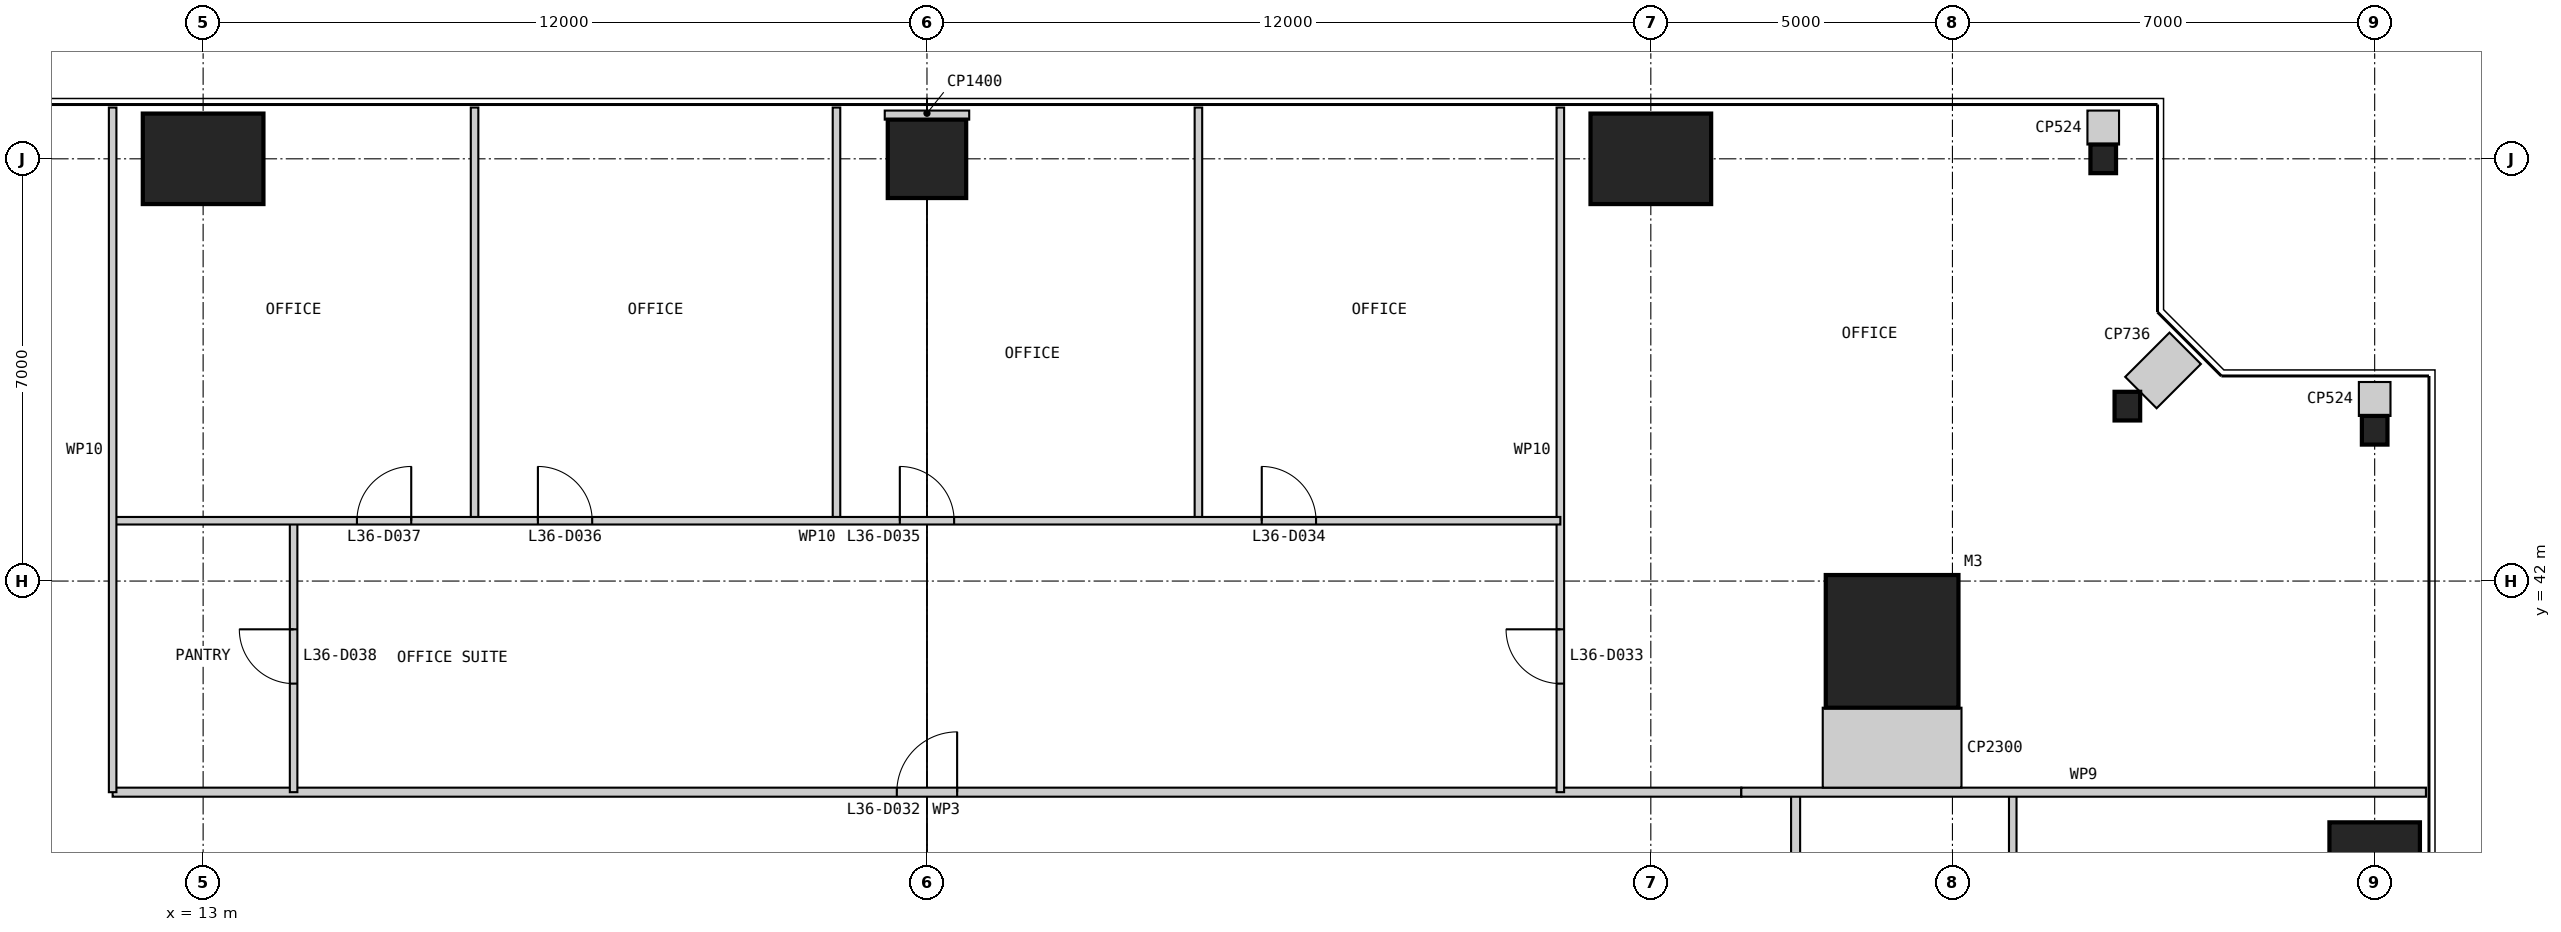
"""IFC4 building model, lengths in metres.
Left out: names, types, materials, properties, quantities, classifications, styles, units other than length and angle.
Written with IfcOpenShell. Run it as: python <this file> out.ifc"""

import sys

from ifc_helpers import new_model, si_unit, direction, frame, frame_2d, origin, origin_2d, place, context, subcontext, project, spatial, rectangle, i_section, extrude, element, fill, save


model = new_model("IFC4")
c1 = context("Model", 3, precision=1e-05, world=origin(), true_north=direction((0.0, 1.0)))
c2 = subcontext(c1, "Body", "Model", "MODEL_VIEW")
j1 = project(units=[si_unit("LENGTHUNIT", "METRE"), si_unit("PLANEANGLEUNIT", "RADIAN")], contexts=[c1])
p1 = place(None, origin())
s1 = spatial("IfcSite", under=j1, at=p1, CompositionType="ELEMENT")
p2 = place(p1, origin())
s2 = spatial("IfcBuilding", under=s1, at=p2, CompositionType="ELEMENT")
p3 = place(p2, frame((0.0, 0.0, 154.4)))
s3 = spatial("IfcBuildingStorey", under=s2, at=p3, CompositionType="ELEMENT", Elevation=154.4)
p4 = place(p3, frame((41.0, 41.0, 0.0), z_axis=(0.0, 0.0, 1.0), x_axis=(1.0, 0.0, 0.0)))
e1 = element("IfcColumn", 1, at=p4, inside=s3, PredefinedType="COLUMN", context=c2, shape_type="SweptSolid", body=[
    extrude(rectangle(XDim=2.2, YDim=2.2, at=origin_2d()), origin(), (0.0, 0.0, 1.0), 4.0),
])
p5 = place(p3, frame((49.0, 37.0, 0.0), z_axis=(0.0, 0.0, 1.0), x_axis=(1.0, 0.0, 0.0)))
e2 = element("IfcColumn", 2, at=p5, inside=s3, PredefinedType="COLUMN", context=c2, shape_type="SweptSolid", body=[
    extrude(rectangle(XDim=1.5, YDim=2.0, at=origin_2d()), origin(), (0.0, 0.0, 1.0), 4.0),
])
for number, where, z_axis, x_axis in (
    (3, (49.0, 44.5, 0.0), (0.0, 0.0, 1.0), (1.0, 0.0, 0.0)),
    (4, (44.9, 44.9, 0.0), (0.0, 0.0, 1.0), (1.0, 0.0, 0.0)),
    (5, (44.5, 49.0, 0.0), (0.0, 0.0, 1.0), (1.0, 0.0, 0.0)),
):
    element("IfcColumn", number, at=place(p3, frame(where, z_axis=z_axis, x_axis=x_axis)), inside=s3, PredefinedType="COLUMN", context=c2, shape_type="SweptSolid", body=[
        extrude(i_section(OverallWidth=0.424, OverallDepth=0.475, WebThickness=0.048, FlangeThickness=0.077, at=origin_2d()), origin(), (0.0, 0.0, 1.0), 4.0),
    ])
p6 = place(p3, frame((37.0, 49.0, 0.0), z_axis=(0.0, 0.0, 1.0), x_axis=(1.0, 0.0, 0.0)))
e6 = element("IfcColumn", 6, at=p6, inside=s3, PredefinedType="COLUMN", context=c2, shape_type="SweptSolid", body=[
    extrude(rectangle(XDim=2.0, YDim=1.5, at=origin_2d()), origin(), (0.0, 0.0, 1.0), 4.0),
])
p7 = place(p3, frame((25.0, 49.0, 0.0), z_axis=(0.0, 0.0, 1.0), x_axis=(1.0, 0.0, 0.0)))
e7 = element("IfcColumn", 7, at=p7, inside=s3, PredefinedType="COLUMN", context=c2, shape_type="SweptSolid", body=[
    extrude(rectangle(XDim=1.3, YDim=1.3, at=origin_2d()), origin(), (0.0, 0.0, 1.0), 4.0),
])
p8 = place(p3, frame((13.0, 49.0, 0.0), z_axis=(0.0, 0.0, 1.0), x_axis=(1.0, 0.0, 0.0)))
e8 = element("IfcColumn", 8, at=p8, inside=s3, PredefinedType="COLUMN", context=c2, shape_type="SweptSolid", body=[
    extrude(rectangle(XDim=2.0, YDim=1.5, at=origin_2d()), origin(), (0.0, 0.0, 1.0), 4.0),
])
p9 = place(p3, frame((39.4, 11.5, 0.0), z_axis=(0.0, 0.0, 1.0), x_axis=(0.0, 1.0, 0.0)))
e9 = element("IfcWall", 9, at=p9, inside=s3, PredefinedType="PARTITIONING", context=c2, shape_type="SweptSolid", body=[
    extrude(rectangle(XDim=27.0, YDim=0.15, at=frame_2d((13.5, 0.0))), origin(), (0.0, 0.0, 1.0), 3.85),
])
p10 = place(p9, frame((3.25, 0.0, 0.0)))
e10 = element("IfcOpeningElement", 10, at=p10, cuts=e9, PredefinedType="OPENING", context=c2, shape_type="SweptSolid", body=[
    extrude(rectangle(XDim=1.0, YDim=2.2, at=frame_2d((0.5, 1.1))), frame((0.0, 0.085, 0.0), z_axis=(0.0, -1.0, 0.0), x_axis=(1.0, 0.0, 0.0)), (0.0, 0.0, 1.0), 0.17),
])
p11 = place(p9, frame((22.75, 0.0, 0.0)))
e11 = element("IfcOpeningElement", 11, at=p11, cuts=e9, PredefinedType="OPENING", context=c2, shape_type="SweptSolid", body=[
    extrude(rectangle(XDim=1.0, YDim=2.2, at=frame_2d((0.5, 1.1))), frame((0.0, 0.085, 0.0), z_axis=(0.0, -1.0, 0.0), x_axis=(1.0, 0.0, 0.0)), (0.0, 0.0, 1.0), 0.17),
])
p12 = place(p9, frame((0.25, 0.0, 0.0)))
e12 = element("IfcOpeningElement", 12, at=p12, cuts=e9, PredefinedType="OPENING", context=c2, shape_type="SweptSolid", body=[
    extrude(rectangle(XDim=1.0, YDim=2.2, at=frame_2d((0.5, 1.1))), frame((0.0, 0.085, 0.0), z_axis=(0.0, -1.0, 0.0), x_axis=(1.0, 0.0, 0.0)), (0.0, 0.0, 1.0), 0.17),
])
p13 = place(p3, frame((43.0, 32.5, 0.0), z_axis=(0.0, 0.0, 1.0), x_axis=(0.0, 1.0, 0.0)))
e13 = element("IfcWall", 13, at=p13, inside=s3, PredefinedType="PARTITIONING", context=c2, shape_type="SweptSolid", body=[
    extrude(rectangle(XDim=6.0, YDim=0.125, at=frame_2d((3.0, 0.0))), origin(), (0.0, 0.0, 1.0), 3.238),
])
p14 = place(p3, frame((38.5, 38.5, 0.0), z_axis=(0.0, 0.0, 1.0), x_axis=(-1.0, 0.0, 0.0)))
e14 = element("IfcWall", 14, at=p14, inside=s3, PredefinedType="PARTITIONING", context=c2, shape_type="SweptSolid", body=[
    extrude(rectangle(XDim=27.0, YDim=0.15, at=frame_2d((13.5, 0.0))), origin(), (0.0, 0.0, 1.0), 3.85),
])
p15 = place(p14, frame((13.0, 0.0, 0.0)))
e15 = element("IfcOpeningElement", 15, at=p15, cuts=e14, PredefinedType="OPENING", context=c2, shape_type="SweptSolid", body=[
    extrude(rectangle(XDim=1.0, YDim=2.2, at=frame_2d((0.5, 1.1))), frame((0.0, 0.085, 0.0), z_axis=(0.0, -1.0, 0.0), x_axis=(1.0, 0.0, 0.0)), (0.0, 0.0, 1.0), 0.17),
])
p16 = place(p3, frame((49.85, 38.5, 0.0), z_axis=(0.0, 0.0, 1.0), x_axis=(-1.0, 0.0, 0.0)))
e16 = element("IfcWall", 16, at=p16, inside=s3, PredefinedType="PARTITIONING", context=c2, shape_type="SweptSolid", body=[
    extrude(rectangle(XDim=11.35, YDim=0.15, at=frame_2d((5.675, 0.0))), origin(), (0.0, 0.0, 1.0), 3.85),
])
p17 = place(p3, frame((35.5, 49.85, 0.0), z_axis=(0.0, 0.0, 1.0), x_axis=(0.0, -1.0, 0.0)))
e17 = element("IfcWall", 17, at=p17, inside=s3, PredefinedType="PARTITIONING", context=c2, shape_type="SweptSolid", body=[
    extrude(rectangle(XDim=11.35, YDim=0.125, at=frame_2d((5.675, 0.0))), origin(), (0.0, 0.0, 1.0), 3.85),
])
p18 = place(p17, frame((8.65, 0.0, 0.0)))
e18 = element("IfcOpeningElement", 18, at=p18, cuts=e17, PredefinedType="OPENING", context=c2, shape_type="SweptSolid", body=[
    extrude(rectangle(XDim=0.9, YDim=2.2, at=frame_2d((0.45, 1.1))), frame((0.0, 0.073, 0.0), z_axis=(0.0, -1.0, 0.0), x_axis=(1.0, 0.0, 0.0)), (0.0, 0.0, 1.0), 0.145),
])
for number, where, z_axis, x_axis in (
    (19, (29.5, 49.85, 0.0), (0.0, 0.0, 1.0), (0.0, -1.0, 0.0)),
    (20, (23.5, 49.85, 0.0), (0.0, 0.0, 1.0), (0.0, -1.0, 0.0)),
    (21, (17.5, 49.85, 0.0), (0.0, 0.0, 1.0), (0.0, -1.0, 0.0)),
):
    element("IfcWall", number, at=place(p3, frame(where, z_axis=z_axis, x_axis=x_axis)), inside=s3, PredefinedType="PARTITIONING", context=c2, shape_type="SweptSolid", body=[
        extrude(rectangle(XDim=6.85, YDim=0.125, at=frame_2d((3.425, 0.0))), origin(), (0.0, 0.0, 1.0), 3.85),
    ])
p19 = place(p3, frame((14.5, 43.0, 0.0), z_axis=(0.0, 0.0, 1.0), x_axis=(0.0, -1.0, 0.0)))
e22 = element("IfcWall", 22, at=p19, inside=s3, PredefinedType="PARTITIONING", context=c2, shape_type="SweptSolid", body=[
    extrude(rectangle(XDim=4.5, YDim=0.125, at=frame_2d((2.25, 0.0))), origin(), (0.0, 0.0, 1.0), 3.85),
])
p20 = place(p19, frame((1.8, 0.0, 0.0)))
e23 = element("IfcOpeningElement", 23, at=p20, cuts=e22, PredefinedType="OPENING", context=c2, shape_type="SweptSolid", body=[
    extrude(rectangle(XDim=0.9, YDim=2.2, at=frame_2d((0.45, 1.1))), frame((0.0, 0.073, 0.0), z_axis=(0.0, -1.0, 0.0), x_axis=(1.0, 0.0, 0.0)), (0.0, 0.0, 1.0), 0.145),
])
p21 = place(p3, frame((35.5, 43.0, 0.0), z_axis=(0.0, 0.0, 1.0), x_axis=(-1.0, 0.0, 0.0)))
e24 = element("IfcWall", 24, at=p21, inside=s3, PredefinedType="PARTITIONING", context=c2, shape_type="SweptSolid", body=[
    extrude(rectangle(XDim=24.0, YDim=0.125, at=frame_2d((12.0, 0.0))), origin(), (0.0, 0.0, 1.0), 3.85),
])
p22 = place(p21, frame((4.05, 0.0, 0.0)))
e25 = element("IfcOpeningElement", 25, at=p22, cuts=e24, PredefinedType="OPENING", context=c2, shape_type="SweptSolid", body=[
    extrude(rectangle(XDim=0.9, YDim=2.2, at=frame_2d((0.45, 1.1))), frame((0.0, 0.073, 0.0), z_axis=(0.0, -1.0, 0.0), x_axis=(1.0, 0.0, 0.0)), (0.0, 0.0, 1.0), 0.145),
])
p23 = place(p21, frame((10.05, 0.0, 0.0)))
e26 = element("IfcOpeningElement", 26, at=p23, cuts=e24, PredefinedType="OPENING", context=c2, shape_type="SweptSolid", body=[
    extrude(rectangle(XDim=0.9, YDim=2.2, at=frame_2d((0.45, 1.1))), frame((0.0, 0.073, 0.0), z_axis=(0.0, -1.0, 0.0), x_axis=(1.0, 0.0, 0.0)), (0.0, 0.0, 1.0), 0.145),
])
p24 = place(p21, frame((16.05, 0.0, 0.0)))
e27 = element("IfcOpeningElement", 27, at=p24, cuts=e24, PredefinedType="OPENING", context=c2, shape_type="SweptSolid", body=[
    extrude(rectangle(XDim=0.9, YDim=2.2, at=frame_2d((0.45, 1.1))), frame((0.0, 0.073, 0.0), z_axis=(0.0, -1.0, 0.0), x_axis=(1.0, 0.0, 0.0)), (0.0, 0.0, 1.0), 0.145),
])
p25 = place(p21, frame((19.05, 0.0, 0.0)))
e28 = element("IfcOpeningElement", 28, at=p25, cuts=e24, PredefinedType="OPENING", context=c2, shape_type="SweptSolid", body=[
    extrude(rectangle(XDim=0.9, YDim=2.2, at=frame_2d((0.45, 1.1))), frame((0.0, 0.073, 0.0), z_axis=(0.0, -1.0, 0.0), x_axis=(1.0, 0.0, 0.0)), (0.0, 0.0, 1.0), 0.145),
])
p26 = place(p3, frame((11.5, 49.85, 0.0), z_axis=(0.0, 0.0, 1.0), x_axis=(0.0, -1.0, 0.0)))
e29 = element("IfcWall", 29, at=p26, inside=s3, PredefinedType="PARTITIONING", context=c2, shape_type="SweptSolid", body=[
    extrude(rectangle(XDim=11.35, YDim=0.125, at=frame_2d((5.675, 0.0))), origin(), (0.0, 0.0, 1.0), 3.85),
])
p27 = place(p3, frame((41.0, 38.575, 0.0), z_axis=(0.0, 0.0, 1.0), x_axis=(0.0, 1.0, 0.0)))
e30 = element("IfcWall", 30, at=p27, inside=s3, PredefinedType="PARTITIONING", context=c2, shape_type="SweptSolid", body=[
    extrude(rectangle(XDim=1.325, YDim=2.3, at=frame_2d((0.663, 0.0))), origin(), (0.0, 0.0, 1.0), 3.85),
])
p28 = place(p3, frame((49.0, 45.3, 0.0), z_axis=(0.0, 0.0, 1.0), x_axis=(0.0, -1.0, 0.0)))
e31 = element("IfcWall", 31, at=p28, inside=s3, PredefinedType="PARTITIONING", context=c2, shape_type="SweptSolid", body=[
    extrude(rectangle(XDim=0.562, YDim=0.524, at=frame_2d((0.281, 0.0))), origin(), (0.0, 0.0, 1.0), 3.85),
])
p29 = place(p3, frame((45.859, 45.859, 0.0), z_axis=(0.0, 0.0, 1.0), x_axis=(-0.707106781187, -0.707106781187, 0.0)))
e32 = element("IfcWall", 32, at=p29, inside=s3, PredefinedType="PARTITIONING", context=c2, shape_type="SweptSolid", body=[
    extrude(rectangle(XDim=1.038, YDim=0.736, at=frame_2d((0.519, 0.0))), origin(), (0.0, 0.0, 1.0), 3.85),
])
p30 = place(p3, frame((44.5, 49.8, 0.0), z_axis=(0.0, 0.0, 1.0), x_axis=(0.0, -1.0, 0.0)))
e33 = element("IfcWall", 33, at=p30, inside=s3, PredefinedType="PARTITIONING", context=c2, shape_type="SweptSolid", body=[
    extrude(rectangle(XDim=0.562, YDim=0.524, at=frame_2d((0.281, 0.0))), origin(), (0.0, 0.0, 1.0), 3.85),
])
p31 = place(p3, frame((25.0, 49.8, 0.0), z_axis=(0.0, 0.0, 1.0), x_axis=(0.0, -1.0, 0.0)))
e34 = element("IfcWall", 34, at=p31, inside=s3, PredefinedType="PARTITIONING", context=c2, shape_type="SweptSolid", body=[
    extrude(rectangle(XDim=0.15, YDim=1.4, at=frame_2d((0.075, 0.0))), origin(), (0.0, 0.0, 1.0), 3.85),
])
p32 = place(p15, frame((1.0, 0.0, 0.0), z_axis=(0.0, 0.0, 1.0), x_axis=(-1.0, 0.0, 0.0)))
e35 = element("IfcDoor", 35, at=p32, inside=s3, OperationType="SINGLE_SWING_RIGHT", PredefinedType="DOOR", context=c2, shape_type="SweptSolid", body=[
    extrude(rectangle(XDim=1.0, YDim=2.2, at=frame_2d((0.5, 1.1))), frame((0.0, 0.025, 0.0), z_axis=(0.0, -1.0, 0.0), x_axis=(1.0, 0.0, 0.0)), (0.0, 0.0, 1.0), 0.05),
])
fill(e15, e35)
p33 = place(p18, frame((0.9, 0.0, 0.0), z_axis=(0.0, 0.0, 1.0), x_axis=(-1.0, 0.0, 0.0)))
e36 = element("IfcDoor", 36, at=p33, inside=s3, OperationType="SINGLE_SWING_RIGHT", PredefinedType="DOOR", context=c2, shape_type="SweptSolid", body=[
    extrude(rectangle(XDim=0.9, YDim=2.2, at=frame_2d((0.45, 1.1))), frame((0.0, 0.025, 0.0), z_axis=(0.0, -1.0, 0.0), x_axis=(1.0, 0.0, 0.0)), (0.0, 0.0, 1.0), 0.05),
])
fill(e18, e36)
p34 = place(p22, frame((0.9, 0.0, 0.0), z_axis=(0.0, 0.0, 1.0), x_axis=(-1.0, 0.0, 0.0)))
e37 = element("IfcDoor", 37, at=p34, inside=s3, OperationType="SINGLE_SWING_LEFT", PredefinedType="DOOR", context=c2, shape_type="SweptSolid", body=[
    extrude(rectangle(XDim=0.9, YDim=2.2, at=frame_2d((0.45, 1.1))), frame((0.0, 0.025, 0.0), z_axis=(0.0, -1.0, 0.0), x_axis=(1.0, 0.0, 0.0)), (0.0, 0.0, 1.0), 0.05),
])
fill(e25, e37)
p35 = place(p23, frame((0.9, 0.0, 0.0), z_axis=(0.0, 0.0, 1.0), x_axis=(-1.0, 0.0, 0.0)))
e38 = element("IfcDoor", 38, at=p35, inside=s3, OperationType="SINGLE_SWING_LEFT", PredefinedType="DOOR", context=c2, shape_type="SweptSolid", body=[
    extrude(rectangle(XDim=0.9, YDim=2.2, at=frame_2d((0.45, 1.1))), frame((0.0, 0.025, 0.0), z_axis=(0.0, -1.0, 0.0), x_axis=(1.0, 0.0, 0.0)), (0.0, 0.0, 1.0), 0.05),
])
fill(e26, e38)
p36 = place(p24, frame((0.9, 0.0, 0.0), z_axis=(0.0, 0.0, 1.0), x_axis=(-1.0, 0.0, 0.0)))
e39 = element("IfcDoor", 39, at=p36, inside=s3, OperationType="SINGLE_SWING_LEFT", PredefinedType="DOOR", context=c2, shape_type="SweptSolid", body=[
    extrude(rectangle(XDim=0.9, YDim=2.2, at=frame_2d((0.45, 1.1))), frame((0.0, 0.025, 0.0), z_axis=(0.0, -1.0, 0.0), x_axis=(1.0, 0.0, 0.0)), (0.0, 0.0, 1.0), 0.05),
])
fill(e27, e39)
p37 = place(p25, frame((0.9, 0.0, 0.0), z_axis=(0.0, 0.0, 1.0), x_axis=(-1.0, 0.0, 0.0)))
e40 = element("IfcDoor", 40, at=p37, inside=s3, OperationType="SINGLE_SWING_RIGHT", PredefinedType="DOOR", context=c2, shape_type="SweptSolid", body=[
    extrude(rectangle(XDim=0.9, YDim=2.2, at=frame_2d((0.45, 1.1))), frame((0.0, 0.025, 0.0), z_axis=(0.0, -1.0, 0.0), x_axis=(1.0, 0.0, 0.0)), (0.0, 0.0, 1.0), 0.05),
])
fill(e28, e40)
p38 = place(p20, frame((0.9, 0.0, 0.0), z_axis=(0.0, 0.0, 1.0), x_axis=(-1.0, 0.0, 0.0)))
e41 = element("IfcDoor", 41, at=p38, inside=s3, OperationType="SINGLE_SWING_RIGHT", PredefinedType="DOOR", context=c2, shape_type="SweptSolid", body=[
    extrude(rectangle(XDim=0.9, YDim=2.2, at=frame_2d((0.45, 1.1))), frame((0.0, 0.025, 0.0), z_axis=(0.0, -1.0, 0.0), x_axis=(1.0, 0.0, 0.0)), (0.0, 0.0, 1.0), 0.05),
])
fill(e23, e41)
save(model, sys.argv[1])
